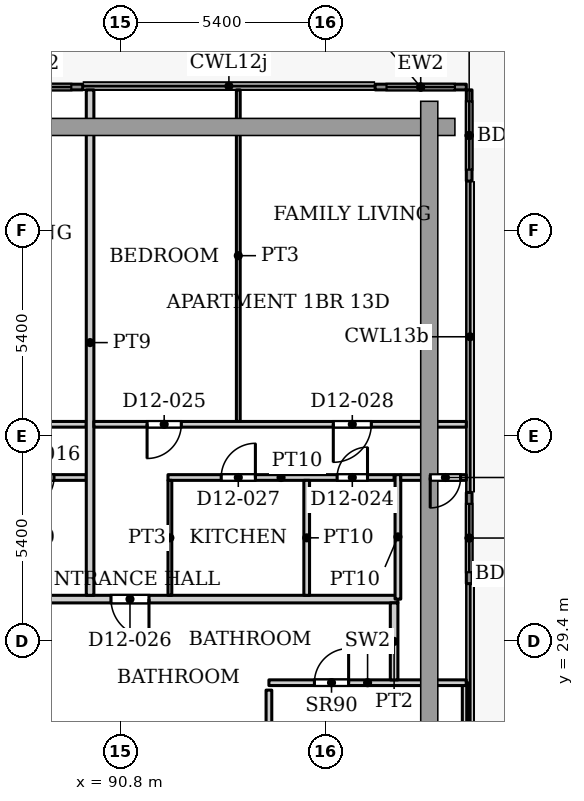
"""IFC4 building model, lengths in metres.
Left out: names, types, materials, properties, quantities, classifications, styles, units other than length and angle.
Written with IfcOpenShell. Run it as: python <this file> out.ifc"""

import sys

from ifc_helpers import new_model, si_unit, direction, frame, frame_2d, origin, place, context, subcontext, project, spatial, rectangle, extrude, source, transform, mapped, element, fill, save


model = new_model("IFC4")
c1 = context("Model", 3, precision=1e-05, world=origin(), true_north=direction((0.0, 1.0)))
c2 = subcontext(c1, "Body", "Model", "MODEL_VIEW")
j1 = project(units=[si_unit("LENGTHUNIT", "METRE"), si_unit("PLANEANGLEUNIT", "RADIAN")], contexts=[c1])
p1 = place(None, origin())
s1 = spatial("IfcSite", under=j1, at=p1, CompositionType="ELEMENT")
p2 = place(p1, origin())
s2 = spatial("IfcBuilding", under=s1, at=p2, CompositionType="ELEMENT")
p3 = place(p2, frame((0.0, 0.0, 57.8)))
s3 = spatial("IfcBuildingStorey", under=s2, at=p3, CompositionType="ELEMENT", Elevation=57.8)
p4 = place(p3, frame((87.406, 43.975, 0.0), z_axis=(0.0, 0.0, 1.0), x_axis=(1.0, 0.0, 0.0)))
e1 = element("IfcWall", 1, at=p4, inside=s3, PredefinedType="SOLIDWALL", context=c2, shape_type="SweptSolid", body=[
    extrude(rectangle(XDim=2.4, YDim=0.15, at=frame_2d((1.2, 0.0))), origin(), (0.0, 0.0, 1.0), 3.75),
])
p5 = place(p4, frame((0.3, 0.0, 0.0)))
e2 = element("IfcOpeningElement", 2, at=p5, cuts=e1, PredefinedType="OPENING", context=c2, shape_type="SweptSolid", body=[
    extrude(rectangle(XDim=1.8, YDim=2.4, at=frame_2d((0.9, 1.2))), frame((0.0, 0.085, 0.0), z_axis=(0.0, -1.0, 0.0), x_axis=(1.0, 0.0, 0.0)), (0.0, 0.0, 1.0), 0.17),
])
p6 = place(p3, frame((97.5, 43.975, 0.0), z_axis=(0.0, 0.0, 1.0), x_axis=(1.0, 0.0, 0.0)))
e3 = element("IfcWall", 3, at=p6, inside=s3, PredefinedType="SOLIDWALL", context=c2, shape_type="SweptSolid", body=[
    extrude(rectangle(XDim=2.4, YDim=0.15, at=frame_2d((1.2, 0.0))), origin(), (0.0, 0.0, 1.0), 3.75),
])
p7 = place(p6, frame((0.3, 0.0, 0.0)))
e4 = element("IfcOpeningElement", 4, at=p7, cuts=e3, PredefinedType="OPENING", context=c2, shape_type="SweptSolid", body=[
    extrude(rectangle(XDim=1.8, YDim=2.4, at=frame_2d((0.9, 1.2))), frame((0.0, 0.085, 0.0), z_axis=(0.0, -1.0, 0.0), x_axis=(1.0, 0.0, 0.0)), (0.0, 0.0, 1.0), 0.17),
])
p8 = place(p3, frame((99.975, 43.9, 0.0), z_axis=(0.0, 0.0, 1.0), x_axis=(0.0, -1.0, 0.0)))
e5 = element("IfcWall", 5, at=p8, inside=s3, PredefinedType="SOLIDWALL", context=c2, shape_type="SweptSolid", body=[
    extrude(rectangle(XDim=2.4, YDim=0.15, at=frame_2d((1.2, 0.0))), origin(), (0.0, 0.0, 1.0), 3.75),
])
p9 = place(p8, frame((0.3, 0.0, 0.0)))
e6 = element("IfcOpeningElement", 6, at=p9, cuts=e5, PredefinedType="OPENING", context=c2, shape_type="SweptSolid", body=[
    extrude(rectangle(XDim=1.8, YDim=2.4, at=frame_2d((0.9, 1.2))), frame((0.0, 0.085, 0.0), z_axis=(0.0, -1.0, 0.0), x_axis=(1.0, 0.0, 0.0)), (0.0, 0.0, 1.0), 0.17),
])
p10 = place(p3, frame((99.975, 33.307, 0.0), z_axis=(0.0, 0.0, 1.0), x_axis=(0.0, -1.0, 0.0)))
e7 = element("IfcWall", 7, at=p10, inside=s3, PredefinedType="SOLIDWALL", context=c2, shape_type="SweptSolid", body=[
    extrude(rectangle(XDim=2.4, YDim=0.15, at=frame_2d((1.2, 0.0))), origin(), (0.0, 0.0, 1.0), 3.75),
])
p11 = place(p10, frame((0.3, 0.0, 0.0)))
e8 = element("IfcOpeningElement", 8, at=p11, cuts=e7, PredefinedType="OPENING", context=c2, shape_type="SweptSolid", body=[
    extrude(rectangle(XDim=1.8, YDim=2.4, at=frame_2d((0.9, 1.2))), frame((0.0, 0.085, 0.0), z_axis=(0.0, -1.0, 0.0), x_axis=(1.0, 0.0, 0.0)), (0.0, 0.0, 1.0), 0.17),
])
p12 = place(p3, frame((99.87, 21.015, 0.0), z_axis=(0.0, 0.0, 1.0), x_axis=(0.0, 1.0, 0.0)))
e9 = element("IfcWall", 9, at=p12, inside=s3, PredefinedType="PARTITIONING", context=c2, shape_type="SweptSolid", body=[
    extrude(rectangle(XDim=7.285, YDim=0.15, at=frame_2d((3.643, 0.0))), origin(), (0.0, 0.0, 1.0), 3.9),
])
p13 = place(p3, frame((94.706, 28.3, 0.0), z_axis=(0.0, 0.0, 1.0), x_axis=(1.0, 0.0, 0.0)))
e10 = element("IfcWall", 10, at=p13, inside=s3, PredefinedType="PARTITIONING", context=c2, shape_type="SweptSolid", body=[
    extrude(rectangle(XDim=5.192, YDim=0.15, at=frame_2d((2.596, 0.0))), origin(), (0.0, 0.0, 1.0), 3.9),
])
p14 = place(p13, frame((1.197, 0.0, 0.0)))
e11 = element("IfcOpeningElement", 11, at=p14, cuts=e10, PredefinedType="OPENING", context=c2, shape_type="SweptSolid", body=[
    extrude(rectangle(XDim=0.9, YDim=2.2, at=frame_2d((0.45, 1.1))), frame((0.0, 0.085, 0.0), z_axis=(0.0, -1.0, 0.0), x_axis=(1.0, 0.0, 0.0)), (0.0, 0.0, 1.0), 0.17),
])
p15 = place(p3, frame((94.706, 21.287, 0.0), z_axis=(0.0, 0.0, 1.0), x_axis=(0.0, 1.0, 0.0)))
e12 = element("IfcWall", 12, at=p15, inside=s3, PredefinedType="PARTITIONING", context=c2, shape_type="SweptSolid", body=[
    extrude(rectangle(XDim=6.818, YDim=0.15, at=frame_2d((3.409, 0.0))), origin(), (0.0, 0.0, 1.0), 3.9),
])
p16 = place(p3, frame((55.9, 30.5, 0.0), z_axis=(0.0, 0.0, 1.0), x_axis=(1.0, 0.0, 0.0)))
e13 = element("IfcWall", 13, at=p16, inside=s3, PredefinedType="PARTITIONING", context=c2, shape_type="SweptSolid", body=[
    extrude(rectangle(XDim=42.2, YDim=0.2, at=frame_2d((21.1, 0.0))), origin(), (0.0, 0.0, 1.0), 3.6),
])
p17 = place(p16, frame((0.6, 0.0, 0.0)))
e14 = element("IfcOpeningElement", 14, at=p17, cuts=e13, PredefinedType="OPENING", context=c2, shape_type="SweptSolid", body=[
    extrude(rectangle(XDim=1.0, YDim=2.1, at=frame_2d((0.5, 1.05))), frame((0.0, 0.11, 0.0), z_axis=(0.0, -1.0, 0.0), x_axis=(1.0, 0.0, 0.0)), (0.0, 0.0, 1.0), 0.22),
])
p18 = place(p16, frame((13.2, 0.0, 0.0)))
e15 = element("IfcOpeningElement", 15, at=p18, cuts=e13, PredefinedType="OPENING", context=c2, shape_type="SweptSolid", body=[
    extrude(rectangle(XDim=1.0, YDim=2.1, at=frame_2d((0.5, 1.05))), frame((0.0, 0.11, 0.0), z_axis=(0.0, -1.0, 0.0), x_axis=(1.0, 0.0, 0.0)), (0.0, 0.0, 1.0), 0.22),
])
p19 = place(p16, frame((22.8, 0.0, 0.0)))
e16 = element("IfcOpeningElement", 16, at=p19, cuts=e13, PredefinedType="OPENING", context=c2, shape_type="SweptSolid", body=[
    extrude(rectangle(XDim=1.0, YDim=2.1, at=frame_2d((0.5, 1.05))), frame((0.0, 0.11, 0.0), z_axis=(0.0, -1.0, 0.0), x_axis=(1.0, 0.0, 0.0)), (0.0, 0.0, 1.0), 0.22),
])
p20 = place(p16, frame((34.65, 0.0, 0.0)))
e17 = element("IfcOpeningElement", 17, at=p20, cuts=e13, PredefinedType="OPENING", context=c2, shape_type="SweptSolid", body=[
    extrude(rectangle(XDim=1.0, YDim=2.1, at=frame_2d((0.5, 1.05))), frame((0.0, 0.11, 0.0), z_axis=(0.0, -1.0, 0.0), x_axis=(1.0, 0.0, 0.0)), (0.0, 0.0, 1.0), 0.22),
])
p21 = place(p3, frame((78.1, 35.1, 0.0), z_axis=(0.0, 0.0, 1.0), x_axis=(1.0, 0.0, 0.0)))
e18 = element("IfcWall", 18, at=p21, inside=s3, PredefinedType="PARTITIONING", context=c2, shape_type="SweptSolid", body=[
    extrude(rectangle(XDim=11.8, YDim=0.15, at=frame_2d((5.9, 0.0))), origin(), (0.0, 0.0, 1.0), 3.6),
])
p22 = place(p21, frame((0.65, 0.0, 0.0)))
e19 = element("IfcOpeningElement", 19, at=p22, cuts=e18, PredefinedType="OPENING", context=c2, shape_type="SweptSolid", body=[
    extrude(rectangle(XDim=0.9, YDim=2.1, at=frame_2d((0.45, 1.05))), frame((0.0, 0.085, 0.0), z_axis=(0.0, -1.0, 0.0), x_axis=(1.0, 0.0, 0.0)), (0.0, 0.0, 1.0), 0.17),
])
p23 = place(p21, frame((8.85, 0.0, 0.0)))
e20 = element("IfcOpeningElement", 20, at=p23, cuts=e18, PredefinedType="OPENING", context=c2, shape_type="SweptSolid", body=[
    extrude(rectangle(XDim=1.0, YDim=2.1, at=frame_2d((0.5, 1.05))), frame((0.0, 0.085, 0.0), z_axis=(0.0, -1.0, 0.0), x_axis=(1.0, 0.0, 0.0)), (0.0, 0.0, 1.0), 0.17),
])
p24 = place(p21, frame((5.15, 0.0, 0.0)))
e21 = element("IfcOpeningElement", 21, at=p24, cuts=e18, PredefinedType="OPENING", context=c2, shape_type="SweptSolid", body=[
    extrude(rectangle(XDim=0.9, YDim=2.1, at=frame_2d((0.45, 1.05))), frame((0.0, 0.085, 0.0), z_axis=(0.0, -1.0, 0.0), x_axis=(1.0, 0.0, 0.0)), (0.0, 0.0, 1.0), 0.17),
])
p25 = place(p3, frame((80.95, 33.7, 0.0), z_axis=(0.0, 0.0, 1.0), x_axis=(1.0, 0.0, 0.0)))
e22 = element("IfcWall", 22, at=p25, inside=s3, PredefinedType="PARTITIONING", context=c2, shape_type="SweptSolid", body=[
    extrude(rectangle(XDim=8.95, YDim=0.15, at=frame_2d((4.475, 0.0))), origin(), (0.0, 0.0, 1.0), 3.6),
])
p26 = place(p25, frame((7.3, 0.0, 0.0)))
e23 = element("IfcOpeningElement", 23, at=p26, cuts=e22, PredefinedType="OPENING", context=c2, shape_type="SweptSolid", body=[
    extrude(rectangle(XDim=0.8, YDim=2.1, at=frame_2d((0.4, 1.05))), frame((0.0, 0.085, 0.0), z_axis=(0.0, -1.0, 0.0), x_axis=(1.0, 0.0, 0.0)), (0.0, 0.0, 1.0), 0.17),
])
p27 = place(p25, frame((1.6, 0.0, 0.0)))
e24 = element("IfcOpeningElement", 24, at=p27, cuts=e22, PredefinedType="OPENING", context=c2, shape_type="SweptSolid", body=[
    extrude(rectangle(XDim=0.9, YDim=2.1, at=frame_2d((0.45, 1.05))), frame((0.0, 0.085, 0.0), z_axis=(0.0, -1.0, 0.0), x_axis=(1.0, 0.0, 0.0)), (0.0, 0.0, 1.0), 0.17),
])
p28 = place(p25, frame((4.9, 0.0, 0.0)))
e25 = element("IfcOpeningElement", 25, at=p28, cuts=e22, PredefinedType="OPENING", context=c2, shape_type="SweptSolid", body=[
    extrude(rectangle(XDim=0.8, YDim=2.1, at=frame_2d((0.4, 1.05))), frame((0.0, 0.085, 0.0), z_axis=(0.0, -1.0, 0.0), x_axis=(1.0, 0.0, 0.0)), (0.0, 0.0, 1.0), 0.17),
])
p29 = place(p3, frame((90.0, 30.6, 0.0), z_axis=(0.0, 0.0, 1.0), x_axis=(0.0, 1.0, 0.0)))
e26 = element("IfcWall", 26, at=p29, inside=s3, PredefinedType="PARTITIONING", context=c2, shape_type="SweptSolid", body=[
    extrude(rectangle(XDim=13.3, YDim=0.2, at=frame_2d((6.65, 0.0))), origin(), (0.0, 0.0, 1.0), 3.6),
])
p30 = place(p3, frame((90.1, 35.1, 0.0), z_axis=(0.0, 0.0, 1.0), x_axis=(1.0, 0.0, 0.0)))
e27 = element("IfcWall", 27, at=p30, inside=s3, PredefinedType="PARTITIONING", context=c2, shape_type="SweptSolid", body=[
    extrude(rectangle(XDim=9.8, YDim=0.15, at=frame_2d((4.9, 0.0))), origin(), (0.0, 0.0, 1.0), 3.6),
])
p31 = place(p30, frame((1.4, 0.0, 0.0)))
e28 = element("IfcOpeningElement", 28, at=p31, cuts=e27, PredefinedType="OPENING", context=c2, shape_type="SweptSolid", body=[
    extrude(rectangle(XDim=0.9, YDim=2.1, at=frame_2d((0.45, 1.05))), frame((0.0, 0.085, 0.0), z_axis=(0.0, -1.0, 0.0), x_axis=(1.0, 0.0, 0.0)), (0.0, 0.0, 1.0), 0.17),
])
p32 = place(p30, frame((6.3, 0.0, 0.0)))
e29 = element("IfcOpeningElement", 29, at=p32, cuts=e27, PredefinedType="OPENING", context=c2, shape_type="SweptSolid", body=[
    extrude(rectangle(XDim=1.0, YDim=2.1, at=frame_2d((0.5, 1.05))), frame((0.0, 0.085, 0.0), z_axis=(0.0, -1.0, 0.0), x_axis=(1.0, 0.0, 0.0)), (0.0, 0.0, 1.0), 0.17),
])
p33 = place(p3, frame((92.05, 33.7, 0.0), z_axis=(0.0, 0.0, 1.0), x_axis=(1.0, 0.0, 0.0)))
e30 = element("IfcWall", 30, at=p33, inside=s3, PredefinedType="PARTITIONING", context=c2, shape_type="SweptSolid", body=[
    extrude(rectangle(XDim=5.95, YDim=0.15, at=frame_2d((2.975, 0.0))), origin(), (0.0, 0.0, 1.0), 3.6),
])
p34 = place(p33, frame((4.45, 0.0, 0.0)))
e31 = element("IfcOpeningElement", 31, at=p34, cuts=e30, PredefinedType="OPENING", context=c2, shape_type="SweptSolid", body=[
    extrude(rectangle(XDim=0.8, YDim=2.1, at=frame_2d((0.4, 1.05))), frame((0.0, 0.085, 0.0), z_axis=(0.0, -1.0, 0.0), x_axis=(1.0, 0.0, 0.0)), (0.0, 0.0, 1.0), 0.17),
])
p35 = place(p33, frame((1.4, 0.0, 0.0)))
e32 = element("IfcOpeningElement", 32, at=p35, cuts=e30, PredefinedType="OPENING", context=c2, shape_type="SweptSolid", body=[
    extrude(rectangle(XDim=0.9, YDim=2.1, at=frame_2d((0.45, 1.05))), frame((0.0, 0.085, 0.0), z_axis=(0.0, -1.0, 0.0), x_axis=(1.0, 0.0, 0.0)), (0.0, 0.0, 1.0), 0.17),
])
p36 = place(p3, frame((92.1, 30.6, 0.0), z_axis=(0.0, 0.0, 1.0), x_axis=(0.0, 1.0, 0.0)))
e33 = element("IfcWall", 33, at=p36, inside=s3, PredefinedType="PARTITIONING", context=c2, shape_type="SweptSolid", body=[
    extrude(rectangle(XDim=3.025, YDim=0.1, at=frame_2d((1.512, 0.0))), origin(), (0.0, 0.0, 1.0), 3.6),
])
p37 = place(p3, frame((93.9, 35.175, 0.0), z_axis=(0.0, 0.0, 1.0), x_axis=(0.0, 1.0, 0.0)))
e34 = element("IfcWall", 34, at=p37, inside=s3, PredefinedType="PARTITIONING", context=c2, shape_type="SweptSolid", body=[
    extrude(rectangle(XDim=8.725, YDim=0.1, at=frame_2d((4.362, 0.0))), origin(), (0.0, 0.0, 1.0), 3.6),
])
p38 = place(p3, frame((95.7, 30.6, 0.0), z_axis=(0.0, 0.0, 1.0), x_axis=(0.0, 1.0, 0.0)))
e35 = element("IfcWall", 35, at=p38, inside=s3, PredefinedType="PARTITIONING", context=c2, shape_type="SweptSolid", body=[
    extrude(rectangle(XDim=3.025, YDim=0.15, at=frame_2d((1.512, 0.0))), origin(), (0.0, 0.0, 1.0), 3.6),
])
p39 = place(p3, frame((98.0, 28.374, 0.0), z_axis=(0.0, 0.0, 1.0), x_axis=(0.0, 1.0, 0.0)))
e36 = element("IfcWall", 36, at=p39, inside=s3, PredefinedType="PARTITIONING", context=c2, shape_type="SweptSolid", body=[
    extrude(rectangle(XDim=2.026, YDim=0.2, at=frame_2d((1.013, 0.0))), origin(), (0.0, 0.0, 1.0), 3.6),
])
p40 = place(p3, frame((98.1, 30.5, 0.0), z_axis=(0.0, 0.0, 1.0), x_axis=(0.0, 1.0, 0.0)))
e37 = element("IfcWall", 37, at=p40, inside=s3, PredefinedType="PARTITIONING", context=c2, shape_type="SweptSolid", body=[
    extrude(rectangle(XDim=3.275, YDim=0.15, at=frame_2d((1.637, 0.0))), origin(), (0.0, 0.0, 1.0), 3.6),
])
p41 = place(p3, frame((98.175, 33.7, 0.0), z_axis=(0.0, 0.0, 1.0), x_axis=(1.0, 0.0, 0.0)))
e38 = element("IfcWall", 38, at=p41, inside=s3, PredefinedType="PARTITIONING", context=c2, shape_type="SweptSolid", body=[
    extrude(rectangle(XDim=1.725, YDim=0.15, at=frame_2d((0.862, 0.0))), origin(), (0.0, 0.0, 1.0), 3.6),
])
p42 = place(p41, frame((0.775, 0.0, 0.0)))
e39 = element("IfcOpeningElement", 39, at=p42, cuts=e38, PredefinedType="OPENING", context=c2, shape_type="SweptSolid", body=[
    extrude(rectangle(XDim=0.8, YDim=2.1, at=frame_2d((0.4, 1.05))), frame((0.0, 0.085, 0.0), z_axis=(0.0, -1.0, 0.0), x_axis=(1.0, 0.0, 0.0)), (0.0, 0.0, 1.0), 0.17),
])
m1 = source(origin(), c2, "Body", "SweptSolid", [
    extrude(rectangle(XDim=1.8, YDim=2.4, at=frame_2d((0.9, 1.2))), frame((0.0, 0.025, 0.0), z_axis=(0.0, -1.0, 0.0), x_axis=(1.0, 0.0, 0.0)), (0.0, 0.0, 1.0), 0.05),
])
p43 = place(p5, origin())
e40 = element("IfcDoor", 40, at=p43, inside=s3, OperationType="SLIDING_TO_LEFT", PredefinedType="DOOR", context=c2, shape_type="MappedRepresentation", body=[
    mapped(m1, transform((0.0, 0.0, 0.0), x_axis=(1.0, 0.0, 0.0), y_axis=(0.0, 1.0, 0.0), z_axis=(0.0, 0.0, 1.0), scale=1.0)),
])
fill(e2, e40)
p44 = place(p7, origin())
e41 = element("IfcDoor", 41, at=p44, inside=s3, OperationType="SLIDING_TO_LEFT", PredefinedType="DOOR", context=c2, shape_type="MappedRepresentation", body=[
    mapped(m1, transform((0.0, 0.0, 0.0), x_axis=(1.0, 0.0, 0.0), y_axis=(0.0, 1.0, 0.0), z_axis=(0.0, 0.0, 1.0), scale=1.0)),
])
fill(e4, e41)
p45 = place(p9, origin())
e42 = element("IfcDoor", 42, at=p45, inside=s3, OperationType="SLIDING_TO_LEFT", PredefinedType="DOOR", context=c2, shape_type="MappedRepresentation", body=[
    mapped(m1, transform((0.0, 0.0, 0.0), x_axis=(1.0, 0.0, 0.0), y_axis=(0.0, 1.0, 0.0), z_axis=(0.0, 0.0, 1.0), scale=1.0)),
])
fill(e6, e42)
p46 = place(p11, origin())
e43 = element("IfcDoor", 43, at=p46, inside=s3, OperationType="SLIDING_TO_LEFT", PredefinedType="DOOR", context=c2, shape_type="MappedRepresentation", body=[
    mapped(m1, transform((0.0, 0.0, 0.0), x_axis=(1.0, 0.0, 0.0), y_axis=(0.0, 1.0, 0.0), z_axis=(0.0, 0.0, 1.0), scale=1.0)),
])
fill(e8, e43)
m2 = source(origin(), c2, "Body", "SweptSolid", [
    extrude(rectangle(XDim=0.9, YDim=2.2, at=frame_2d((0.45, 1.1))), frame((0.0, 0.025, 0.0), z_axis=(0.0, -1.0, 0.0), x_axis=(1.0, 0.0, 0.0)), (0.0, 0.0, 1.0), 0.05),
])
p47 = place(p14, origin())
e44 = element("IfcDoor", 44, at=p47, inside=s3, OperationType="SINGLE_SWING_LEFT", PredefinedType="DOOR", context=c2, shape_type="MappedRepresentation", body=[
    mapped(m2, transform((0.0, 0.0, 0.0), x_axis=(1.0, 0.0, 0.0), y_axis=(0.0, 1.0, 0.0), z_axis=(0.0, 0.0, 1.0), scale=1.0)),
])
fill(e11, e44)
m3 = source(origin(), c2, "Body", "SweptSolid", [
    extrude(rectangle(XDim=0.8, YDim=2.1, at=frame_2d((0.4, 1.05))), frame((0.0, 0.025, 0.0), z_axis=(0.0, -1.0, 0.0), x_axis=(1.0, 0.0, 0.0)), (0.0, 0.0, 1.0), 0.05),
])
p48 = place(p26, origin())
e45 = element("IfcDoor", 45, at=p48, inside=s3, OperationType="SINGLE_SWING_RIGHT", PredefinedType="DOOR", context=c2, shape_type="MappedRepresentation", body=[
    mapped(m3, transform((0.0, 0.0, 0.0), x_axis=(1.0, 0.0, 0.0), y_axis=(0.0, 1.0, 0.0), z_axis=(0.0, 0.0, 1.0), scale=1.0)),
])
fill(e23, e45)
p49 = place(p34, origin())
e46 = element("IfcDoor", 46, at=p49, inside=s3, OperationType="SINGLE_SWING_LEFT", PredefinedType="DOOR", context=c2, shape_type="MappedRepresentation", body=[
    mapped(m3, transform((0.0, 0.0, 0.0), x_axis=(1.0, 0.0, 0.0), y_axis=(0.0, 1.0, 0.0), z_axis=(0.0, 0.0, 1.0), scale=1.0)),
])
fill(e31, e46)
m4 = source(origin(), c2, "Body", "SweptSolid", [
    extrude(rectangle(XDim=0.9, YDim=2.1, at=frame_2d((0.45, 1.05))), frame((0.0, 0.025, 0.0), z_axis=(0.0, -1.0, 0.0), x_axis=(1.0, 0.0, 0.0)), (0.0, 0.0, 1.0), 0.05),
])
p50 = place(p31, origin())
e47 = element("IfcDoor", 47, at=p50, inside=s3, OperationType="SINGLE_SWING_RIGHT", PredefinedType="DOOR", context=c2, shape_type="MappedRepresentation", body=[
    mapped(m4, transform((0.0, 0.0, 0.0), x_axis=(1.0, 0.0, 0.0), y_axis=(0.0, 1.0, 0.0), z_axis=(0.0, 0.0, 1.0), scale=1.0)),
])
fill(e28, e47)
m5 = source(origin(), c2, "Body", "SweptSolid", [
    extrude(rectangle(XDim=1.0, YDim=2.1, at=frame_2d((0.5, 1.05))), frame((0.0, 0.025, 0.0), z_axis=(0.0, -1.0, 0.0), x_axis=(1.0, 0.0, 0.0)), (0.0, 0.0, 1.0), 0.05),
])
p51 = place(p20, origin())
e48 = element("IfcDoor", 48, at=p51, inside=s3, OperationType="SINGLE_SWING_RIGHT", PredefinedType="DOOR", context=c2, shape_type="MappedRepresentation", body=[
    mapped(m5, transform((0.0, 0.0, 0.0), x_axis=(1.0, 0.0, 0.0), y_axis=(0.0, 1.0, 0.0), z_axis=(0.0, 0.0, 1.0), scale=1.0)),
])
fill(e17, e48)
p52 = place(p35, origin())
e49 = element("IfcDoor", 49, at=p52, inside=s3, OperationType="SINGLE_SWING_LEFT", PredefinedType="DOOR", context=c2, shape_type="MappedRepresentation", body=[
    mapped(m4, transform((0.0, 0.0, 0.0), x_axis=(1.0, 0.0, 0.0), y_axis=(0.0, 1.0, 0.0), z_axis=(0.0, 0.0, 1.0), scale=1.0)),
])
fill(e32, e49)
m6 = source(origin(), c2, "Body", "SweptSolid", [
    extrude(rectangle(XDim=1.0, YDim=2.1, at=frame_2d((0.5, 1.05))), frame((0.0, 0.025, 0.0), z_axis=(0.0, -1.0, 0.0), x_axis=(1.0, 0.0, 0.0)), (0.0, 0.0, 1.0), 0.05),
])
p53 = place(p32, origin())
e50 = element("IfcDoor", 50, at=p53, inside=s3, OperationType="SINGLE_SWING_RIGHT", PredefinedType="DOOR", context=c2, shape_type="MappedRepresentation", body=[
    mapped(m6, transform((0.0, 0.0, 0.0), x_axis=(1.0, 0.0, 0.0), y_axis=(0.0, 1.0, 0.0), z_axis=(0.0, 0.0, 1.0), scale=1.0)),
])
fill(e29, e50)
p54 = place(p42, origin())
e51 = element("IfcDoor", 51, at=p54, inside=s3, OperationType="SINGLE_SWING_RIGHT", PredefinedType="DOOR", context=c2, shape_type="MappedRepresentation", body=[
    mapped(m3, transform((0.0, 0.0, 0.0), x_axis=(1.0, 0.0, 0.0), y_axis=(0.0, 1.0, 0.0), z_axis=(0.0, 0.0, 1.0), scale=1.0)),
])
fill(e39, e51)
save(model, sys.argv[1])
